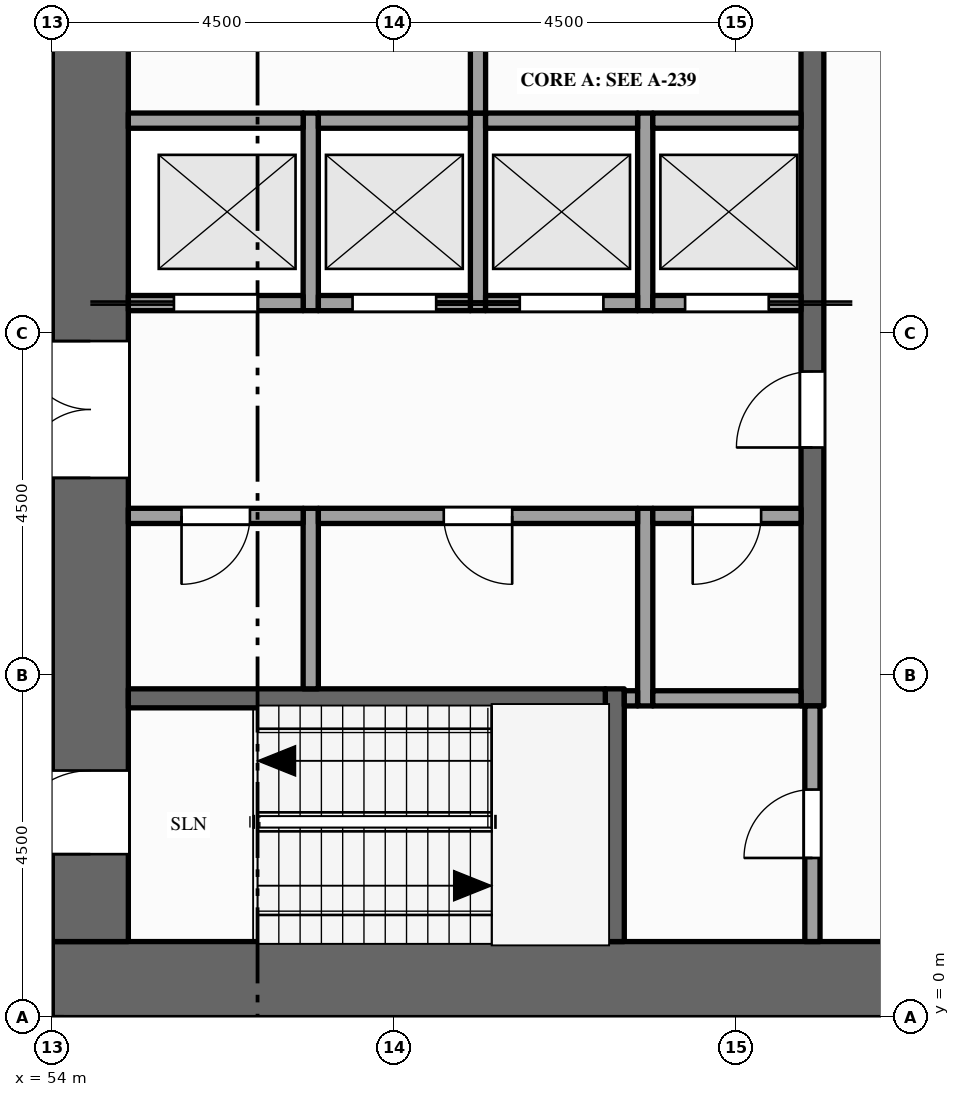
"""IFC4 building model, lengths in metres.
Left out: names, types, materials, properties, quantities, classifications, styles, units other than length and angle.
Written with IfcOpenShell. Run it as: python <this file> out.ifc"""

import sys

from ifc_helpers import new_model, si_unit, direction, frame, frame_2d, origin, place, context, subcontext, project, spatial, rectangle, extrude, element, fill, save


model = new_model("IFC4")
c1 = context("Model", 3, precision=1e-05, world=origin(), true_north=direction((0.0, 1.0)))
c2 = subcontext(c1, "Body", "Model", "MODEL_VIEW")
j1 = project(units=[si_unit("LENGTHUNIT", "METRE"), si_unit("PLANEANGLEUNIT", "RADIAN")], contexts=[c1])
p1 = place(None, origin())
s1 = spatial("IfcSite", under=j1, at=p1, CompositionType="ELEMENT")
p2 = place(p1, origin())
s2 = spatial("IfcBuilding", under=s1, at=p2, CompositionType="ELEMENT")
p3 = place(p2, frame((0.0, 0.0, 215.0)))
s3 = spatial("IfcBuildingStorey", under=s2, at=p3, CompositionType="ELEMENT", Elevation=215.0)
p4 = place(p3, frame((67.5, 0.5, -0.15), z_axis=(0.0, 0.0, 1.0), x_axis=(-1.0, 0.0, 0.0)))
e1 = element("IfcWall", 1, at=p4, inside=s3, PredefinedType="SHEAR", context=c2, shape_type="SweptSolid", body=[
    extrude(rectangle(XDim=13.5, YDim=1.0, at=frame_2d((6.75, 0.0))), origin(), (0.0, 0.0, 1.0), 4.0),
])
p5 = place(p3, frame((54.5, 1.0, -0.15), z_axis=(0.0, 0.0, 1.0), x_axis=(0.0, 1.0, 0.0)))
e2 = element("IfcWall", 2, at=p5, inside=s3, PredefinedType="SHEAR", context=c2, shape_type="SweptSolid", body=[
    extrude(rectangle(XDim=20.5, YDim=1.0, at=frame_2d((10.25, 0.0))), origin(), (0.0, 0.0, 1.0), 4.0),
])
p6 = place(p5, frame((6.1, 0.0, 0.15)))
e3 = element("IfcOpeningElement", 3, at=p6, cuts=e2, PredefinedType="OPENING", context=c2, shape_type="SweptSolid", body=[
    extrude(rectangle(XDim=1.8, YDim=2.1, at=frame_2d((0.9, 1.05))), frame((0.0, 0.51, 0.0), z_axis=(0.0, -1.0, 0.0), x_axis=(1.0, 0.0, 0.0)), (0.0, 0.0, 1.0), 1.02),
])
p7 = place(p5, frame((12.15, 0.0, 0.15)))
e4 = element("IfcOpeningElement", 4, at=p7, cuts=e2, PredefinedType="OPENING", context=c2, shape_type="SweptSolid", body=[
    extrude(rectangle(XDim=1.1, YDim=2.1, at=frame_2d((0.55, 1.05))), frame((0.0, 0.51, 0.0), z_axis=(0.0, -1.0, 0.0), x_axis=(1.0, 0.0, 0.0)), (0.0, 0.0, 1.0), 1.02),
])
p8 = place(p5, frame((1.15, 0.0, 0.15)))
e5 = element("IfcOpeningElement", 5, at=p8, cuts=e2, PredefinedType="OPENING", context=c2, shape_type="SweptSolid", body=[
    extrude(rectangle(XDim=1.1, YDim=2.1, at=frame_2d((0.55, 1.05))), frame((0.0, 0.51, 0.0), z_axis=(0.0, -1.0, 0.0), x_axis=(1.0, 0.0, 0.0)), (0.0, 0.0, 1.0), 1.02),
])
p9 = place(p5, frame((18.35, 0.0, 0.15)))
e6 = element("IfcOpeningElement", 6, at=p9, cuts=e2, PredefinedType="OPENING", context=c2, shape_type="SweptSolid", body=[
    extrude(rectangle(XDim=1.1, YDim=2.1, at=frame_2d((0.55, 1.05))), frame((0.0, 0.51, 0.0), z_axis=(0.0, -1.0, 0.0), x_axis=(1.0, 0.0, 0.0)), (0.0, 0.0, 1.0), 1.02),
])
p10 = place(p3, frame((57.4, 4.325, 0.0), z_axis=(0.0, 0.0, 1.0), x_axis=(0.0, 1.0, 0.0)))
e7 = element("IfcWall", 7, at=p10, inside=s3, PredefinedType="PARTITIONING", context=c2, shape_type="SweptSolid", body=[
    extrude(rectangle(XDim=2.375, YDim=0.2, at=frame_2d((1.188, 0.0))), origin(), (0.0, 0.0, 1.0), 3.85),
])
for number, where, z_axis, x_axis in (
    (8, (57.4, 9.3, 0.0), (0.0, 0.0, 1.0), (0.0, 1.0, 0.0)),
    (9, (59.6, 9.3, 0.0), (0.0, 0.0, 1.0), (0.0, 1.0, 0.0)),
):
    element("IfcWall", number, at=place(p3, frame(where, z_axis=z_axis, x_axis=x_axis)), inside=s3, PredefinedType="SOLIDWALL", context=c2, shape_type="SweptSolid", body=[
        extrude(rectangle(XDim=2.6, YDim=0.2, at=frame_2d((1.3, 0.0))), origin(), (0.0, 0.0, 1.0), 3.85),
    ])
p11 = place(p3, frame((59.6, 11.9, 0.0), z_axis=(0.0, 0.0, 1.0), x_axis=(0.0, 1.0, 0.0)))
e10 = element("IfcWall", 10, at=p11, inside=s3, PredefinedType="PARTITIONING", context=c2, shape_type="SweptSolid", body=[
    extrude(rectangle(XDim=3.6, YDim=0.2, at=frame_2d((1.8, 0.0))), origin(), (0.0, 0.0, 1.0), 3.85),
])
p12 = place(p11, frame((1.3, 0.0, 0.0)))
e11 = element("IfcOpeningElement", 11, at=p12, cuts=e10, PredefinedType="OPENING", context=c2, shape_type="SweptSolid", body=[
    extrude(rectangle(XDim=1.0, YDim=2.1, at=frame_2d((0.5, 1.05))), frame((0.0, 0.11, 0.0), z_axis=(0.0, -1.0, 0.0), x_axis=(1.0, 0.0, 0.0)), (0.0, 0.0, 1.0), 0.22),
])
p13 = place(p3, frame((61.4, 1.0, 0.0), z_axis=(0.0, 0.0, 1.0), x_axis=(0.0, 1.0, 0.0)))
e12 = element("IfcWall", 12, at=p13, inside=s3, PredefinedType="SHEAR", context=c2, shape_type="SweptSolid", body=[
    extrude(rectangle(XDim=3.325, YDim=0.25, at=frame_2d((1.663, 0.0))), origin(), (0.0, 0.0, 1.0), 3.85),
])
p14 = place(p3, frame((61.8, 4.1, 0.0), z_axis=(0.0, 0.0, 1.0), x_axis=(0.0, 1.0, 0.0)))
e13 = element("IfcWall", 13, at=p14, inside=s3, PredefinedType="PARTITIONING", context=c2, shape_type="SweptSolid", body=[
    extrude(rectangle(XDim=2.6, YDim=0.2, at=frame_2d((1.3, 0.0))), origin(), (0.0, 0.0, 1.0), 3.85),
])
p15 = place(p3, frame((61.8, 9.3, 0.0), z_axis=(0.0, 0.0, 1.0), x_axis=(0.0, 1.0, 0.0)))
e14 = element("IfcWall", 14, at=p15, inside=s3, PredefinedType="SOLIDWALL", context=c2, shape_type="SweptSolid", body=[
    extrude(rectangle(XDim=2.6, YDim=0.2, at=frame_2d((1.3, 0.0))), origin(), (0.0, 0.0, 1.0), 3.85),
])
p16 = place(p3, frame((64.0, 1.0, 0.0), z_axis=(0.0, 0.0, 1.0), x_axis=(0.0, 1.0, 0.0)))
e15 = element("IfcWall", 15, at=p16, inside=s3, PredefinedType="PARTITIONING", context=c2, shape_type="SweptSolid", body=[
    extrude(rectangle(XDim=3.1, YDim=0.2, at=frame_2d((1.55, 0.0))), origin(), (0.0, 0.0, 1.0), 3.85),
])
p17 = place(p16, frame((1.1, 0.0, 0.0)))
e16 = element("IfcOpeningElement", 16, at=p17, cuts=e15, PredefinedType="OPENING", context=c2, shape_type="SweptSolid", body=[
    extrude(rectangle(XDim=0.9, YDim=2.1, at=frame_2d((0.45, 1.05))), frame((0.0, 0.11, 0.0), z_axis=(0.0, -1.0, 0.0), x_axis=(1.0, 0.0, 0.0)), (0.0, 0.0, 1.0), 0.22),
])
p18 = place(p3, frame((64.0, 4.1, 0.0), z_axis=(0.0, 0.0, 1.0), x_axis=(0.0, 1.0, 0.0)))
e17 = element("IfcWall", 17, at=p18, inside=s3, PredefinedType="SHEAR", context=c2, shape_type="SweptSolid", body=[
    extrude(rectangle(XDim=14.5, YDim=0.3, at=frame_2d((7.25, 0.0))), origin(), (0.0, 0.0, 1.0), 3.85),
])
p19 = place(p18, frame((3.4, 0.0, 0.0)))
e18 = element("IfcOpeningElement", 18, at=p19, cuts=e17, PredefinedType="OPENING", context=c2, shape_type="SweptSolid", body=[
    extrude(rectangle(XDim=1.0, YDim=2.1, at=frame_2d((0.5, 1.05))), frame((0.0, 0.16, 0.0), z_axis=(0.0, -1.0, 0.0), x_axis=(1.0, 0.0, 0.0)), (0.0, 0.0, 1.0), 0.32),
])
p20 = place(p18, frame((9.1, 0.0, 0.0)))
e19 = element("IfcOpeningElement", 19, at=p20, cuts=e17, PredefinedType="OPENING", context=c2, shape_type="SweptSolid", body=[
    extrude(rectangle(XDim=1.0, YDim=2.1, at=frame_2d((0.5, 1.05))), frame((0.0, 0.16, 0.0), z_axis=(0.0, -1.0, 0.0), x_axis=(1.0, 0.0, 0.0)), (0.0, 0.0, 1.0), 0.32),
])
p21 = place(p3, frame((55.0, 4.2, 0.0), z_axis=(0.0, 0.0, 1.0), x_axis=(1.0, 0.0, 0.0)))
e20 = element("IfcWall", 20, at=p21, inside=s3, PredefinedType="SHEAR", context=c2, shape_type="SweptSolid", body=[
    extrude(rectangle(XDim=6.275, YDim=0.25, at=frame_2d((3.137, 0.0))), origin(), (0.0, 0.0, 1.0), 3.85),
])
p22 = place(p3, frame((61.525, 4.2, 0.0), z_axis=(0.0, 0.0, 1.0), x_axis=(1.0, 0.0, 0.0)))
e21 = element("IfcWall", 21, at=p22, inside=s3, PredefinedType="PARTITIONING", context=c2, shape_type="SweptSolid", body=[
    extrude(rectangle(XDim=0.175, YDim=0.2, at=frame_2d((0.087, 0.0))), origin(), (0.0, 0.0, 1.0), 3.85),
])
p23 = place(p3, frame((61.9, 4.2, 0.0), z_axis=(0.0, 0.0, 1.0), x_axis=(1.0, 0.0, 0.0)))
e22 = element("IfcWall", 22, at=p23, inside=s3, PredefinedType="PARTITIONING", context=c2, shape_type="SweptSolid", body=[
    extrude(rectangle(XDim=1.95, YDim=0.2, at=frame_2d((0.975, 0.0))), origin(), (0.0, 0.0, 1.0), 3.85),
])
p24 = place(p3, frame((55.0, 6.6, 0.0), z_axis=(0.0, 0.0, 1.0), x_axis=(1.0, 0.0, 0.0)))
e23 = element("IfcWall", 23, at=p24, inside=s3, PredefinedType="PARTITIONING", context=c2, shape_type="SweptSolid", body=[
    extrude(rectangle(XDim=2.3, YDim=0.2, at=frame_2d((1.15, 0.0))), origin(), (0.0, 0.0, 1.0), 3.85),
])
p25 = place(p24, frame((0.7, 0.0, 0.0)))
e24 = element("IfcOpeningElement", 24, at=p25, cuts=e23, PredefinedType="OPENING", context=c2, shape_type="SweptSolid", body=[
    extrude(rectangle(XDim=0.9, YDim=2.1, at=frame_2d((0.45, 1.05))), frame((0.0, 0.11, 0.0), z_axis=(0.0, -1.0, 0.0), x_axis=(1.0, 0.0, 0.0)), (0.0, 0.0, 1.0), 0.22),
])
p26 = place(p3, frame((57.5, 6.6, 0.0), z_axis=(0.0, 0.0, 1.0), x_axis=(1.0, 0.0, 0.0)))
e25 = element("IfcWall", 25, at=p26, inside=s3, PredefinedType="PARTITIONING", context=c2, shape_type="SweptSolid", body=[
    extrude(rectangle(XDim=4.2, YDim=0.2, at=frame_2d((2.1, 0.0))), origin(), (0.0, 0.0, 1.0), 3.85),
])
p27 = place(p26, frame((1.65, 0.0, 0.0)))
e26 = element("IfcOpeningElement", 26, at=p27, cuts=e25, PredefinedType="OPENING", context=c2, shape_type="SweptSolid", body=[
    extrude(rectangle(XDim=0.9, YDim=2.1, at=frame_2d((0.45, 1.05))), frame((0.0, 0.11, 0.0), z_axis=(0.0, -1.0, 0.0), x_axis=(1.0, 0.0, 0.0)), (0.0, 0.0, 1.0), 0.22),
])
p28 = place(p3, frame((61.9, 6.6, 0.0), z_axis=(0.0, 0.0, 1.0), x_axis=(1.0, 0.0, 0.0)))
e27 = element("IfcWall", 27, at=p28, inside=s3, PredefinedType="PARTITIONING", context=c2, shape_type="SweptSolid", body=[
    extrude(rectangle(XDim=1.95, YDim=0.2, at=frame_2d((0.975, 0.0))), origin(), (0.0, 0.0, 1.0), 3.85),
])
p29 = place(p28, frame((0.525, 0.0, 0.0)))
e28 = element("IfcOpeningElement", 28, at=p29, cuts=e27, PredefinedType="OPENING", context=c2, shape_type="SweptSolid", body=[
    extrude(rectangle(XDim=0.9, YDim=2.1, at=frame_2d((0.45, 1.05))), frame((0.0, 0.11, 0.0), z_axis=(0.0, -1.0, 0.0), x_axis=(1.0, 0.0, 0.0)), (0.0, 0.0, 1.0), 0.22),
])
p30 = place(p3, frame((55.0, 9.4, 0.0), z_axis=(0.0, 0.0, 1.0), x_axis=(1.0, 0.0, 0.0)))
e29 = element("IfcWall", 29, at=p30, inside=s3, PredefinedType="SOLIDWALL", context=c2, shape_type="SweptSolid", body=[
    extrude(rectangle(XDim=2.3, YDim=0.2, at=frame_2d((1.15, 0.0))), origin(), (0.0, 0.0, 1.0), 3.85),
])
p31 = place(p30, frame((0.6, 0.0, 0.012)))
e30 = element("IfcOpeningElement", 30, at=p31, cuts=e29, PredefinedType="OPENING", context=c2, shape_type="SweptSolid", body=[
    extrude(rectangle(XDim=1.1, YDim=2.1, at=frame_2d((0.55, 1.05))), frame((0.0, 0.11, 0.0), z_axis=(0.0, -1.0, 0.0), x_axis=(1.0, 0.0, 0.0)), (0.0, 0.0, 1.0), 0.22),
])
p32 = place(p3, frame((57.5, 9.4, 0.0), z_axis=(0.0, 0.0, 1.0), x_axis=(1.0, 0.0, 0.0)))
e31 = element("IfcWall", 31, at=p32, inside=s3, PredefinedType="SOLIDWALL", context=c2, shape_type="SweptSolid", body=[
    extrude(rectangle(XDim=2.0, YDim=0.2, at=frame_2d((1.0, 0.0))), origin(), (0.0, 0.0, 1.0), 3.85),
])
p33 = place(p32, frame((0.45, 0.0, 0.012)))
e32 = element("IfcOpeningElement", 32, at=p33, cuts=e31, PredefinedType="OPENING", context=c2, shape_type="SweptSolid", body=[
    extrude(rectangle(XDim=1.1, YDim=2.1, at=frame_2d((0.55, 1.05))), frame((0.0, 0.11, 0.0), z_axis=(0.0, -1.0, 0.0), x_axis=(1.0, 0.0, 0.0)), (0.0, 0.0, 1.0), 0.22),
])
p34 = place(p3, frame((59.7, 9.4, 0.0), z_axis=(0.0, 0.0, 1.0), x_axis=(1.0, 0.0, 0.0)))
e33 = element("IfcWall", 33, at=p34, inside=s3, PredefinedType="SOLIDWALL", context=c2, shape_type="SweptSolid", body=[
    extrude(rectangle(XDim=2.0, YDim=0.2, at=frame_2d((1.0, 0.0))), origin(), (0.0, 0.0, 1.0), 3.85),
])
p35 = place(p34, frame((0.45, 0.0, 0.012)))
e34 = element("IfcOpeningElement", 34, at=p35, cuts=e33, PredefinedType="OPENING", context=c2, shape_type="SweptSolid", body=[
    extrude(rectangle(XDim=1.1, YDim=2.1, at=frame_2d((0.55, 1.05))), frame((0.0, 0.11, 0.0), z_axis=(0.0, -1.0, 0.0), x_axis=(1.0, 0.0, 0.0)), (0.0, 0.0, 1.0), 0.22),
])
p36 = place(p3, frame((61.9, 9.4, 0.0), z_axis=(0.0, 0.0, 1.0), x_axis=(1.0, 0.0, 0.0)))
e35 = element("IfcWall", 35, at=p36, inside=s3, PredefinedType="SOLIDWALL", context=c2, shape_type="SweptSolid", body=[
    extrude(rectangle(XDim=1.95, YDim=0.2, at=frame_2d((0.975, 0.0))), origin(), (0.0, 0.0, 1.0), 3.85),
])
p37 = place(p36, frame((0.425, 0.0, 0.012)))
e36 = element("IfcOpeningElement", 36, at=p37, cuts=e35, PredefinedType="OPENING", context=c2, shape_type="SweptSolid", body=[
    extrude(rectangle(XDim=1.1, YDim=2.1, at=frame_2d((0.55, 1.05))), frame((0.0, 0.11, 0.0), z_axis=(0.0, -1.0, 0.0), x_axis=(1.0, 0.0, 0.0)), (0.0, 0.0, 1.0), 0.22),
])
p38 = place(p3, frame((55.0, 11.8, 0.0), z_axis=(0.0, 0.0, 1.0), x_axis=(1.0, 0.0, 0.0)))
e37 = element("IfcWall", 37, at=p38, inside=s3, PredefinedType="SOLIDWALL", context=c2, shape_type="SweptSolid", body=[
    extrude(rectangle(XDim=2.3, YDim=0.2, at=frame_2d((1.15, 0.0))), origin(), (0.0, 0.0, 1.0), 3.85),
])
for number, where, z_axis, x_axis in (
    (38, (57.5, 11.8, 0.0), (0.0, 0.0, 1.0), (1.0, 0.0, 0.0)),
    (39, (59.7, 11.8, 0.0), (0.0, 0.0, 1.0), (1.0, 0.0, 0.0)),
):
    element("IfcWall", number, at=place(p3, frame(where, z_axis=z_axis, x_axis=x_axis)), inside=s3, PredefinedType="SOLIDWALL", context=c2, shape_type="SweptSolid", body=[
        extrude(rectangle(XDim=2.0, YDim=0.2, at=frame_2d((1.0, 0.0))), origin(), (0.0, 0.0, 1.0), 3.85),
    ])
p39 = place(p3, frame((61.9, 11.8, 0.0), z_axis=(0.0, 0.0, 1.0), x_axis=(1.0, 0.0, 0.0)))
e40 = element("IfcWall", 40, at=p39, inside=s3, PredefinedType="SOLIDWALL", context=c2, shape_type="SweptSolid", body=[
    extrude(rectangle(XDim=1.95, YDim=0.2, at=frame_2d((0.975, 0.0))), origin(), (0.0, 0.0, 1.0), 3.85),
])
p40 = place(p31, origin())
e41 = element("IfcDoor", 41, at=p40, inside=s3, OperationType="SLIDING_TO_LEFT", PredefinedType="DOOR", context=c2, shape_type="SweptSolid", body=[
    extrude(rectangle(XDim=1.1, YDim=2.1, at=frame_2d((0.55, 1.05))), frame((0.0, 0.025, 0.0), z_axis=(0.0, -1.0, 0.0), x_axis=(1.0, 0.0, 0.0)), (0.0, 0.0, 1.0), 0.05),
])
fill(e30, e41)
p41 = place(p33, origin())
e42 = element("IfcDoor", 42, at=p41, inside=s3, OperationType="SLIDING_TO_RIGHT", PredefinedType="DOOR", context=c2, shape_type="SweptSolid", body=[
    extrude(rectangle(XDim=1.1, YDim=2.1, at=frame_2d((0.55, 1.05))), frame((0.0, 0.025, 0.0), z_axis=(0.0, -1.0, 0.0), x_axis=(1.0, 0.0, 0.0)), (0.0, 0.0, 1.0), 0.05),
])
fill(e32, e42)
p42 = place(p35, origin())
e43 = element("IfcDoor", 43, at=p42, inside=s3, OperationType="SLIDING_TO_LEFT", PredefinedType="DOOR", context=c2, shape_type="SweptSolid", body=[
    extrude(rectangle(XDim=1.1, YDim=2.1, at=frame_2d((0.55, 1.05))), frame((0.0, 0.025, 0.0), z_axis=(0.0, -1.0, 0.0), x_axis=(1.0, 0.0, 0.0)), (0.0, 0.0, 1.0), 0.05),
])
fill(e34, e43)
p43 = place(p37, origin())
e44 = element("IfcDoor", 44, at=p43, inside=s3, OperationType="SLIDING_TO_RIGHT", PredefinedType="DOOR", context=c2, shape_type="SweptSolid", body=[
    extrude(rectangle(XDim=1.1, YDim=2.1, at=frame_2d((0.55, 1.05))), frame((0.0, 0.025, 0.0), z_axis=(0.0, -1.0, 0.0), x_axis=(1.0, 0.0, 0.0)), (0.0, 0.0, 1.0), 0.05),
])
fill(e36, e44)
p44 = place(p6, origin())
e45 = element("IfcDoor", 45, at=p44, inside=s3, OperationType="DOUBLE_DOOR_SINGLE_SWING", PredefinedType="DOOR", context=c2, shape_type="SweptSolid", body=[
    extrude(rectangle(XDim=1.8, YDim=2.1, at=frame_2d((0.9, 1.05))), frame((0.0, 0.025, 0.0), z_axis=(0.0, -1.0, 0.0), x_axis=(1.0, 0.0, 0.0)), (0.0, 0.0, 1.0), 0.05),
])
fill(e3, e45)
p45 = place(p19, origin())
e46 = element("IfcDoor", 46, at=p45, inside=s3, OperationType="SINGLE_SWING_LEFT", PredefinedType="DOOR", context=c2, shape_type="SweptSolid", body=[
    extrude(rectangle(XDim=1.0, YDim=2.1, at=frame_2d((0.5, 1.05))), frame((0.0, 0.025, 0.0), z_axis=(0.0, -1.0, 0.0), x_axis=(1.0, 0.0, 0.0)), (0.0, 0.0, 1.0), 0.05),
])
fill(e18, e46)
p46 = place(p8, origin())
e47 = element("IfcDoor", 47, at=p46, inside=s3, OperationType="SINGLE_SWING_LEFT", PredefinedType="DOOR", context=c2, shape_type="SweptSolid", body=[
    extrude(rectangle(XDim=1.1, YDim=2.1, at=frame_2d((0.55, 1.05))), frame((0.0, 0.025, 0.0), z_axis=(0.0, -1.0, 0.0), x_axis=(1.0, 0.0, 0.0)), (0.0, 0.0, 1.0), 0.05),
])
fill(e5, e47)
p47 = place(p17, origin())
e48 = element("IfcDoor", 48, at=p47, inside=s3, OperationType="SINGLE_SWING_LEFT", PredefinedType="DOOR", context=c2, shape_type="SweptSolid", body=[
    extrude(rectangle(XDim=0.9, YDim=2.1, at=frame_2d((0.45, 1.05))), frame((0.0, 0.025, 0.0), z_axis=(0.0, -1.0, 0.0), x_axis=(1.0, 0.0, 0.0)), (0.0, 0.0, 1.0), 0.05),
])
fill(e16, e48)
p48 = place(p25, origin())
e49 = element("IfcDoor", 49, at=p48, inside=s3, OperationType="SINGLE_SWING_LEFT", PredefinedType="DOOR", context=c2, shape_type="SweptSolid", body=[
    extrude(rectangle(XDim=0.9, YDim=2.1, at=frame_2d((0.45, 1.05))), frame((0.0, 0.025, 0.0), z_axis=(0.0, -1.0, 0.0), x_axis=(1.0, 0.0, 0.0)), (0.0, 0.0, 1.0), 0.05),
])
fill(e24, e49)
p49 = place(p27, origin())
e50 = element("IfcDoor", 50, at=p49, inside=s3, OperationType="SINGLE_SWING_RIGHT", PredefinedType="DOOR", context=c2, shape_type="SweptSolid", body=[
    extrude(rectangle(XDim=0.9, YDim=2.1, at=frame_2d((0.45, 1.05))), frame((0.0, 0.025, 0.0), z_axis=(0.0, -1.0, 0.0), x_axis=(1.0, 0.0, 0.0)), (0.0, 0.0, 1.0), 0.05),
])
fill(e26, e50)
p50 = place(p29, origin())
e51 = element("IfcDoor", 51, at=p50, inside=s3, OperationType="SINGLE_SWING_LEFT", PredefinedType="DOOR", context=c2, shape_type="SweptSolid", body=[
    extrude(rectangle(XDim=0.9, YDim=2.1, at=frame_2d((0.45, 1.05))), frame((0.0, 0.025, 0.0), z_axis=(0.0, -1.0, 0.0), x_axis=(1.0, 0.0, 0.0)), (0.0, 0.0, 1.0), 0.05),
])
fill(e28, e51)
save(model, sys.argv[1])
